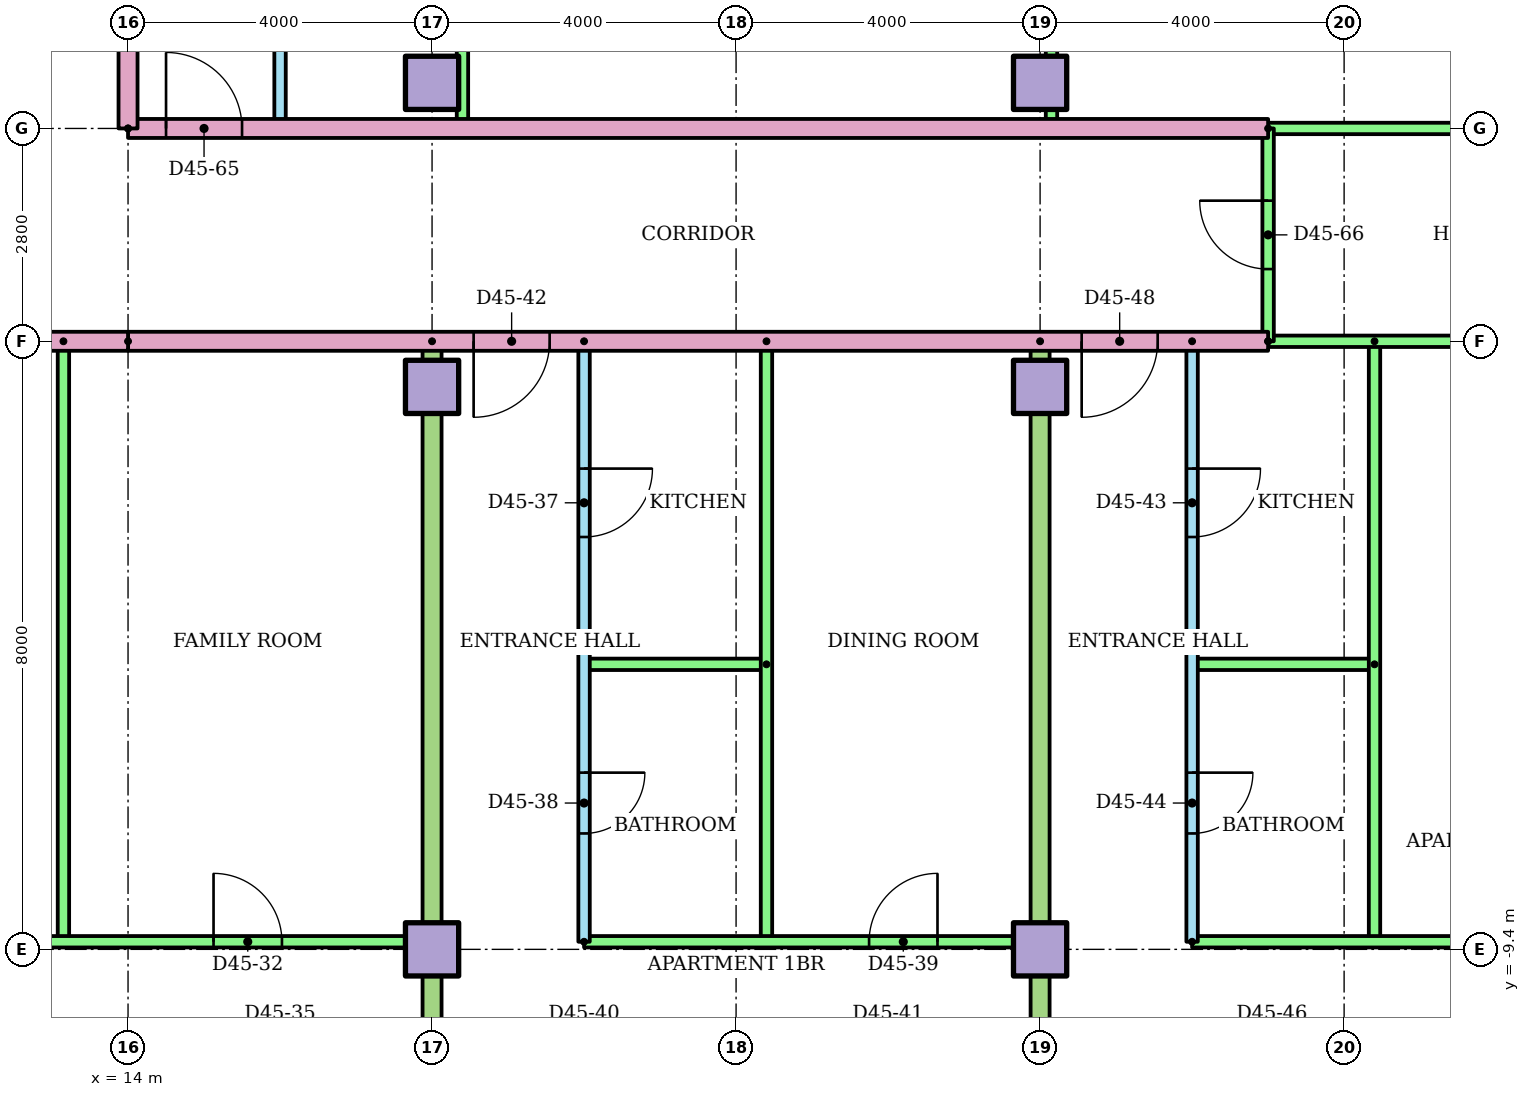
"""IFC4 building model, lengths in metres.
Left out: names, types, materials, properties, quantities, classifications, styles, units other than length and angle.
Written with IfcOpenShell. Run it as: python <this file> out.ifc"""

import sys

from ifc_helpers import new_model, si_unit, direction, frame, frame_2d, origin, origin_2d, place, context, subcontext, project, spatial, rectangle, extrude, element, fill, save


model = new_model("IFC4")
c1 = context("Model", 3, precision=1e-05, world=origin(), true_north=direction((0.0, 1.0)))
c2 = subcontext(c1, "Body", "Model", "MODEL_VIEW")
j1 = project(units=[si_unit("LENGTHUNIT", "METRE"), si_unit("PLANEANGLEUNIT", "RADIAN")], contexts=[c1])
p1 = place(None, origin())
s1 = spatial("IfcSite", under=j1, at=p1, CompositionType="ELEMENT")
p2 = place(p1, origin())
s2 = spatial("IfcBuilding", under=s1, at=p2, CompositionType="ELEMENT")
p3 = place(p2, frame((0.0, 0.0, 174.9)))
s3 = spatial("IfcBuildingStorey", under=s2, at=p3, CompositionType="ELEMENT", Elevation=174.9)
for number, where in (
    (1, (18.0, -9.4, 0.0)),
    (2, (26.0, -9.4, 0.0)),
    (3, (18.0, -2.0, 0.0)),
    (4, (26.0, -2.0, 0.0)),
    (5, (18.0, 2.0, 0.0)),
    (6, (26.0, 2.0, 0.0)),
):
    element("IfcColumn", number, at=place(p3, frame(where)), inside=s3, PredefinedType="COLUMN", context=c2, shape_type="SweptSolid", body=[
        extrude(rectangle(XDim=0.7, YDim=0.7, at=origin_2d()), origin(), (0.0, 0.0, 1.0), 3.2),
    ])
p4 = place(p3, frame((13.15, -1.4, 0.0), z_axis=(0.0, 0.0, 1.0), x_axis=(0.0, -1.0, 0.0)))
e7 = element("IfcWall", 7, at=p4, inside=s3, PredefinedType="PARTITIONING", context=c2, shape_type="SweptSolid", body=[
    extrude(rectangle(XDim=7.9, YDim=0.15, at=frame_2d((3.95, 0.0))), origin(), (0.0, 0.0, 1.0), 2.4),
])
p5 = place(p3, frame((4.0, -9.3, 0.0)))
e8 = element("IfcWall", 8, at=p5, inside=s3, PredefinedType="PARTITIONING", context=c2, shape_type="SweptSolid", body=[
    extrude(rectangle(XDim=14.0, YDim=0.15, at=frame_2d((7.0, 0.0))), origin(), (0.0, 0.0, 1.0), 2.4),
])
p6 = place(p5, frame((3.45, 0.0, 0.0)))
e9 = element("IfcOpeningElement", 9, at=p6, cuts=e8, PredefinedType="OPENING", context=c2, shape_type="SweptSolid", body=[
    extrude(rectangle(XDim=0.9, YDim=2.1, at=frame_2d((0.45, 1.05))), frame((0.0, 0.085, 0.0), z_axis=(0.0, -1.0, 0.0), x_axis=(1.0, 0.0, 0.0)), (0.0, 0.0, 1.0), 0.17),
])
p7 = place(p5, frame((6.825, 0.0, 0.0)))
e10 = element("IfcOpeningElement", 10, at=p7, cuts=e8, PredefinedType="OPENING", context=c2, shape_type="SweptSolid", body=[
    extrude(rectangle(XDim=0.9, YDim=2.1, at=frame_2d((0.45, 1.05))), frame((0.0, 0.085, 0.0), z_axis=(0.0, -1.0, 0.0), x_axis=(1.0, 0.0, 0.0)), (0.0, 0.0, 1.0), 0.17),
])
p8 = place(p5, frame((11.125, 0.0, 0.0)))
e11 = element("IfcOpeningElement", 11, at=p8, cuts=e8, PredefinedType="OPENING", context=c2, shape_type="SweptSolid", body=[
    extrude(rectangle(XDim=0.9, YDim=2.1, at=frame_2d((0.45, 1.05))), frame((0.0, 0.085, 0.0), z_axis=(0.0, -1.0, 0.0), x_axis=(1.0, 0.0, 0.0)), (0.0, 0.0, 1.0), 0.17),
])
p9 = place(p3, frame((20.0, -1.4, 0.0), z_axis=(0.0, 0.0, 1.0), x_axis=(0.0, -1.0, 0.0)))
e12 = element("IfcWall", 12, at=p9, inside=s3, PredefinedType="PARTITIONING", context=c2, shape_type="SweptSolid", body=[
    extrude(rectangle(XDim=7.9, YDim=0.15, at=frame_2d((3.95, 0.0))), origin(), (0.0, 0.0, 1.0), 2.4),
])
p10 = place(p9, frame((1.675, 0.0, 0.0)))
e13 = element("IfcOpeningElement", 13, at=p10, cuts=e12, PredefinedType="OPENING", context=c2, shape_type="SweptSolid", body=[
    extrude(rectangle(XDim=0.9, YDim=2.1, at=frame_2d((0.45, 1.05))), frame((0.0, 0.085, 0.0), z_axis=(0.0, -1.0, 0.0), x_axis=(1.0, 0.0, 0.0)), (0.0, 0.0, 1.0), 0.17),
])
p11 = place(p9, frame((5.675, 0.0, 0.0)))
e14 = element("IfcOpeningElement", 14, at=p11, cuts=e12, PredefinedType="OPENING", context=c2, shape_type="SweptSolid", body=[
    extrude(rectangle(XDim=0.8, YDim=2.1, at=frame_2d((0.4, 1.05))), frame((0.0, 0.085, 0.0), z_axis=(0.0, -1.0, 0.0), x_axis=(1.0, 0.0, 0.0)), (0.0, 0.0, 1.0), 0.17),
])
p12 = place(p3, frame((22.4, -5.65, 0.0), z_axis=(0.0, 0.0, 1.0), x_axis=(-1.0, 0.0, 0.0)))
e15 = element("IfcWall", 15, at=p12, inside=s3, PredefinedType="PARTITIONING", context=c2, shape_type="SweptSolid", body=[
    extrude(rectangle(XDim=2.4, YDim=0.15, at=frame_2d((1.2, 0.0))), origin(), (0.0, 0.0, 1.0), 2.4),
])
p13 = place(p3, frame((22.4, -1.4, 0.0), z_axis=(0.0, 0.0, 1.0), x_axis=(0.0, -1.0, 0.0)))
e16 = element("IfcWall", 16, at=p13, inside=s3, PredefinedType="PARTITIONING", context=c2, shape_type="SweptSolid", body=[
    extrude(rectangle(XDim=7.9, YDim=0.15, at=frame_2d((3.95, 0.0))), origin(), (0.0, 0.0, 1.0), 2.4),
])
p14 = place(p3, frame((20.0, -9.3, 0.0)))
e17 = element("IfcWall", 17, at=p14, inside=s3, PredefinedType="PARTITIONING", context=c2, shape_type="SweptSolid", body=[
    extrude(rectangle(XDim=6.0, YDim=0.15, at=frame_2d((3.0, 0.0))), origin(), (0.0, 0.0, 1.0), 2.4),
])
p15 = place(p14, frame((3.75, 0.0, 0.0)))
e18 = element("IfcOpeningElement", 18, at=p15, cuts=e17, PredefinedType="OPENING", context=c2, shape_type="SweptSolid", body=[
    extrude(rectangle(XDim=0.9, YDim=2.1, at=frame_2d((0.45, 1.05))), frame((0.0, 0.085, 0.0), z_axis=(0.0, -1.0, 0.0), x_axis=(1.0, 0.0, 0.0)), (0.0, 0.0, 1.0), 0.17),
])
p16 = place(p3, frame((18.0, -1.4, 0.0), z_axis=(0.0, 0.0, 1.0), x_axis=(0.0, -1.0, 0.0)))
e19 = element("IfcWall", 19, at=p16, inside=s3, PredefinedType="PARTITIONING", context=c2, shape_type="SweptSolid", body=[
    extrude(rectangle(XDim=15.01, YDim=0.25, at=frame_2d((7.505, 0.0))), origin(), (0.0, 0.0, 1.0), 2.4),
])
p17 = place(p3, frame((28.0, -1.4, 0.0), z_axis=(0.0, 0.0, 1.0), x_axis=(0.0, -1.0, 0.0)))
e20 = element("IfcWall", 20, at=p17, inside=s3, PredefinedType="PARTITIONING", context=c2, shape_type="SweptSolid", body=[
    extrude(rectangle(XDim=7.9, YDim=0.15, at=frame_2d((3.95, 0.0))), origin(), (0.0, 0.0, 1.0), 2.4),
])
p18 = place(p17, frame((1.675, 0.0, 0.0)))
e21 = element("IfcOpeningElement", 21, at=p18, cuts=e20, PredefinedType="OPENING", context=c2, shape_type="SweptSolid", body=[
    extrude(rectangle(XDim=0.9, YDim=2.1, at=frame_2d((0.45, 1.05))), frame((0.0, 0.085, 0.0), z_axis=(0.0, -1.0, 0.0), x_axis=(1.0, 0.0, 0.0)), (0.0, 0.0, 1.0), 0.17),
])
p19 = place(p17, frame((5.675, 0.0, 0.0)))
e22 = element("IfcOpeningElement", 22, at=p19, cuts=e20, PredefinedType="OPENING", context=c2, shape_type="SweptSolid", body=[
    extrude(rectangle(XDim=0.8, YDim=2.1, at=frame_2d((0.4, 1.05))), frame((0.0, 0.085, 0.0), z_axis=(0.0, -1.0, 0.0), x_axis=(1.0, 0.0, 0.0)), (0.0, 0.0, 1.0), 0.17),
])
p20 = place(p3, frame((30.4, -5.65, 0.0), z_axis=(0.0, 0.0, 1.0), x_axis=(-1.0, 0.0, 0.0)))
e23 = element("IfcWall", 23, at=p20, inside=s3, PredefinedType="PARTITIONING", context=c2, shape_type="SweptSolid", body=[
    extrude(rectangle(XDim=2.4, YDim=0.15, at=frame_2d((1.2, 0.0))), origin(), (0.0, 0.0, 1.0), 2.4),
])
p21 = place(p3, frame((30.4, -1.4, 0.0), z_axis=(0.0, 0.0, 1.0), x_axis=(0.0, -1.0, 0.0)))
e24 = element("IfcWall", 24, at=p21, inside=s3, PredefinedType="PARTITIONING", context=c2, shape_type="SweptSolid", body=[
    extrude(rectangle(XDim=7.9, YDim=0.15, at=frame_2d((3.95, 0.0))), origin(), (0.0, 0.0, 1.0), 2.4),
])
p22 = place(p3, frame((28.0, -9.3, 0.0)))
e25 = element("IfcWall", 25, at=p22, inside=s3, PredefinedType="PARTITIONING", context=c2, shape_type="SweptSolid", body=[
    extrude(rectangle(XDim=8.82, YDim=0.15, at=frame_2d((4.41, 0.0))), origin(), (0.0, 0.0, 1.0), 2.4),
])
p23 = place(p22, frame((4.553, 0.0, 0.0)))
e26 = element("IfcOpeningElement", 26, at=p23, cuts=e25, PredefinedType="OPENING", context=c2, shape_type="SweptSolid", body=[
    extrude(rectangle(XDim=0.9, YDim=2.1, at=frame_2d((0.45, 1.05))), frame((0.0, 0.085, 0.0), z_axis=(0.0, -1.0, 0.0), x_axis=(1.0, 0.0, 0.0)), (0.0, 0.0, 1.0), 0.17),
])
p24 = place(p3, frame((26.0, -1.4, 0.0), z_axis=(0.0, 0.0, 1.0), x_axis=(0.0, -1.0, 0.0)))
e27 = element("IfcWall", 27, at=p24, inside=s3, PredefinedType="PARTITIONING", context=c2, shape_type="SweptSolid", body=[
    extrude(rectangle(XDim=15.01, YDim=0.25, at=frame_2d((7.505, 0.0))), origin(), (0.0, 0.0, 1.0), 2.4),
])
p25 = place(p3, frame((29.0, -1.4, 0.0), z_axis=(0.0, 0.0, 1.0), x_axis=(-1.0, 0.0, 0.0)))
e28 = element("IfcWall", 28, at=p25, inside=s3, PredefinedType="PARTITIONING", context=c2, shape_type="SweptSolid", body=[
    extrude(rectangle(XDim=15.0, YDim=0.25, at=frame_2d((7.5, 0.0))), origin(), (0.0, 0.0, 1.0), 2.4),
])
p26 = place(p25, frame((9.453, 0.0, 0.0)))
e29 = element("IfcOpeningElement", 29, at=p26, cuts=e28, PredefinedType="OPENING", context=c2, shape_type="SweptSolid", body=[
    extrude(rectangle(XDim=1.0, YDim=2.1, at=frame_2d((0.5, 1.05))), frame((0.0, 0.135, 0.0), z_axis=(0.0, -1.0, 0.0), x_axis=(1.0, 0.0, 0.0)), (0.0, 0.0, 1.0), 0.27),
])
p27 = place(p25, frame((1.453, 0.0, 0.0)))
e30 = element("IfcOpeningElement", 30, at=p27, cuts=e28, PredefinedType="OPENING", context=c2, shape_type="SweptSolid", body=[
    extrude(rectangle(XDim=1.0, YDim=2.1, at=frame_2d((0.5, 1.05))), frame((0.0, 0.135, 0.0), z_axis=(0.0, -1.0, 0.0), x_axis=(1.0, 0.0, 0.0)), (0.0, 0.0, 1.0), 0.27),
])
p28 = place(p3, frame((36.82, -1.4, 0.0), z_axis=(0.0, 0.0, 1.0), x_axis=(-1.0, 0.0, 0.0)))
e31 = element("IfcWall", 31, at=p28, inside=s3, PredefinedType="PARTITIONING", context=c2, shape_type="SweptSolid", body=[
    extrude(rectangle(XDim=7.82, YDim=0.15, at=frame_2d((3.91, 0.0))), origin(), (0.0, 0.0, 1.0), 2.4),
])
p29 = place(p3, frame((16.0, 11.7, 0.0), z_axis=(0.0, 0.0, 1.0), x_axis=(0.0, -1.0, 0.0)))
e32 = element("IfcWall", 32, at=p29, inside=s3, PredefinedType="PARTITIONING", context=c2, shape_type="SweptSolid", body=[
    extrude(rectangle(XDim=10.3, YDim=0.15, at=frame_2d((5.15, 0.0))), origin(), (0.0, 0.0, 1.0), 2.4),
])
p30 = place(p29, frame((6.975, 0.0, 0.0)))
e33 = element("IfcOpeningElement", 33, at=p30, cuts=e32, PredefinedType="OPENING", context=c2, shape_type="SweptSolid", body=[
    extrude(rectangle(XDim=0.9, YDim=2.1, at=frame_2d((0.45, 1.05))), frame((0.0, 0.085, 0.0), z_axis=(0.0, -1.0, 0.0), x_axis=(1.0, 0.0, 0.0)), (0.0, 0.0, 1.0), 0.17),
])
p31 = place(p29, frame((1.875, 0.0, 0.0)))
e34 = element("IfcOpeningElement", 34, at=p31, cuts=e32, PredefinedType="OPENING", context=c2, shape_type="SweptSolid", body=[
    extrude(rectangle(XDim=0.8, YDim=2.1, at=frame_2d((0.4, 1.05))), frame((0.0, 0.085, 0.0), z_axis=(0.0, -1.0, 0.0), x_axis=(1.0, 0.0, 0.0)), (0.0, 0.0, 1.0), 0.17),
])
for number, where, z_axis, x_axis in (
    (35, (18.4, 11.7, 0.0), (0.0, 0.0, 1.0), (0.0, -1.0, 0.0)),
    (36, (26.15, 11.7, 0.0), (0.0, 0.0, 1.0), (0.0, -1.0, 0.0)),
):
    element("IfcWall", number, at=place(p3, frame(where, z_axis=z_axis, x_axis=x_axis)), inside=s3, PredefinedType="PARTITIONING", context=c2, shape_type="SweptSolid", body=[
        extrude(rectangle(XDim=10.3, YDim=0.15, at=frame_2d((5.15, 0.0))), origin(), (0.0, 0.0, 1.0), 2.4),
    ])
p32 = place(p3, frame((14.0, 1.4, 0.0)))
e37 = element("IfcWall", 37, at=p32, inside=s3, PredefinedType="PARTITIONING", context=c2, shape_type="SweptSolid", body=[
    extrude(rectangle(XDim=15.0, YDim=0.25, at=frame_2d((7.5, 0.0))), origin(), (0.0, 0.0, 1.0), 2.4),
])
p33 = place(p32, frame((0.5, 0.0, 0.0)))
e38 = element("IfcOpeningElement", 38, at=p33, cuts=e37, PredefinedType="OPENING", context=c2, shape_type="SweptSolid", body=[
    extrude(rectangle(XDim=1.0, YDim=2.1, at=frame_2d((0.5, 1.05))), frame((0.0, 0.135, 0.0), z_axis=(0.0, -1.0, 0.0), x_axis=(1.0, 0.0, 0.0)), (0.0, 0.0, 1.0), 0.27),
])
p34 = place(p3, frame((29.0, 1.4, 0.0)))
e39 = element("IfcWall", 39, at=p34, inside=s3, PredefinedType="PARTITIONING", context=c2, shape_type="SweptSolid", body=[
    extrude(rectangle(XDim=7.82, YDim=0.15, at=frame_2d((3.91, 0.0))), origin(), (0.0, 0.0, 1.0), 2.4),
])
p35 = place(p3, frame((29.0, -1.4, 0.0), z_axis=(0.0, 0.0, 1.0), x_axis=(0.0, 1.0, 0.0)))
e40 = element("IfcWall", 40, at=p35, inside=s3, PredefinedType="PARTITIONING", context=c2, shape_type="SweptSolid", body=[
    extrude(rectangle(XDim=2.8, YDim=0.15, at=frame_2d((1.4, 0.0))), origin(), (0.0, 0.0, 1.0), 2.4),
])
p36 = place(p35, frame((0.95, 0.0, 0.0)))
e41 = element("IfcOpeningElement", 41, at=p36, cuts=e40, PredefinedType="OPENING", context=c2, shape_type="SweptSolid", body=[
    extrude(rectangle(XDim=0.9, YDim=2.1, at=frame_2d((0.45, 1.05))), frame((0.0, 0.085, 0.0), z_axis=(0.0, -1.0, 0.0), x_axis=(1.0, 0.0, 0.0)), (0.0, 0.0, 1.0), 0.17),
])
p37 = place(p3, frame((14.0, -1.4, 0.0), z_axis=(0.0, 0.0, 1.0), x_axis=(-1.0, 0.0, 0.0)))
e42 = element("IfcWall", 42, at=p37, inside=s3, PredefinedType="PARTITIONING", context=c2, shape_type="SweptSolid", body=[
    extrude(rectangle(XDim=28.0, YDim=0.25, at=frame_2d((14.0, 0.0))), origin(), (0.0, 0.0, 1.0), 2.4),
])
p38 = place(p37, frame((12.547, 0.0, 0.0)))
e43 = element("IfcOpeningElement", 43, at=p38, cuts=e42, PredefinedType="OPENING", context=c2, shape_type="SweptSolid", body=[
    extrude(rectangle(XDim=1.0, YDim=2.1, at=frame_2d((0.5, 1.05))), frame((0.0, 0.135, 0.0), z_axis=(0.0, -1.0, 0.0), x_axis=(1.0, 0.0, 0.0)), (0.0, 0.0, 1.0), 0.27),
])
p39 = place(p37, frame((10.453, 0.0, 0.0)))
e44 = element("IfcOpeningElement", 44, at=p39, cuts=e42, PredefinedType="OPENING", context=c2, shape_type="SweptSolid", body=[
    extrude(rectangle(XDim=1.0, YDim=2.1, at=frame_2d((0.5, 1.05))), frame((0.0, 0.135, 0.0), z_axis=(0.0, -1.0, 0.0), x_axis=(1.0, 0.0, 0.0)), (0.0, 0.0, 1.0), 0.27),
])
p40 = place(p3, frame((14.0, 1.4, 0.0), z_axis=(0.0, 0.0, 1.0), x_axis=(0.0, 1.0, 0.0)))
e45 = element("IfcWall", 45, at=p40, inside=s3, PredefinedType="PARTITIONING", context=c2, shape_type="SweptSolid", body=[
    extrude(rectangle(XDim=1.6, YDim=0.25, at=frame_2d((0.8, 0.0))), origin(), (0.0, 0.0, 1.0), 2.4),
])
p41 = place(p8, origin())
e46 = element("IfcDoor", 46, at=p41, inside=s3, OperationType="SINGLE_SWING_LEFT", PredefinedType="DOOR", context=c2, shape_type="SweptSolid", body=[
    extrude(rectangle(XDim=0.9, YDim=2.1, at=frame_2d((0.45, 1.05))), frame((0.0, 0.025, 0.0), z_axis=(0.0, -1.0, 0.0), x_axis=(1.0, 0.0, 0.0)), (0.0, 0.0, 1.0), 0.05),
])
fill(e11, e46)
p42 = place(p10, origin())
e47 = element("IfcDoor", 47, at=p42, inside=s3, OperationType="SINGLE_SWING_LEFT", PredefinedType="DOOR", context=c2, shape_type="SweptSolid", body=[
    extrude(rectangle(XDim=0.9, YDim=2.1, at=frame_2d((0.45, 1.05))), frame((0.0, 0.025, 0.0), z_axis=(0.0, -1.0, 0.0), x_axis=(1.0, 0.0, 0.0)), (0.0, 0.0, 1.0), 0.05),
])
fill(e13, e47)
p43 = place(p11, origin())
e48 = element("IfcDoor", 48, at=p43, inside=s3, OperationType="SINGLE_SWING_LEFT", PredefinedType="DOOR", context=c2, shape_type="SweptSolid", body=[
    extrude(rectangle(XDim=0.8, YDim=2.1, at=frame_2d((0.4, 1.05))), frame((0.0, 0.025, 0.0), z_axis=(0.0, -1.0, 0.0), x_axis=(1.0, 0.0, 0.0)), (0.0, 0.0, 1.0), 0.05),
])
fill(e14, e48)
p44 = place(p15, origin())
e49 = element("IfcDoor", 49, at=p44, inside=s3, OperationType="SINGLE_SWING_RIGHT", PredefinedType="DOOR", context=c2, shape_type="SweptSolid", body=[
    extrude(rectangle(XDim=0.9, YDim=2.1, at=frame_2d((0.45, 1.05))), frame((0.0, 0.025, 0.0), z_axis=(0.0, -1.0, 0.0), x_axis=(1.0, 0.0, 0.0)), (0.0, 0.0, 1.0), 0.05),
])
fill(e18, e49)
p45 = place(p26, origin())
e50 = element("IfcDoor", 50, at=p45, inside=s3, OperationType="SINGLE_SWING_RIGHT", PredefinedType="DOOR", context=c2, shape_type="SweptSolid", body=[
    extrude(rectangle(XDim=1.0, YDim=2.1, at=frame_2d((0.5, 1.05))), frame((0.0, 0.025, 0.0), z_axis=(0.0, -1.0, 0.0), x_axis=(1.0, 0.0, 0.0)), (0.0, 0.0, 1.0), 0.05),
])
fill(e29, e50)
p46 = place(p18, origin())
e51 = element("IfcDoor", 51, at=p46, inside=s3, OperationType="SINGLE_SWING_LEFT", PredefinedType="DOOR", context=c2, shape_type="SweptSolid", body=[
    extrude(rectangle(XDim=0.9, YDim=2.1, at=frame_2d((0.45, 1.05))), frame((0.0, 0.025, 0.0), z_axis=(0.0, -1.0, 0.0), x_axis=(1.0, 0.0, 0.0)), (0.0, 0.0, 1.0), 0.05),
])
fill(e21, e51)
p47 = place(p19, origin())
e52 = element("IfcDoor", 52, at=p47, inside=s3, OperationType="SINGLE_SWING_LEFT", PredefinedType="DOOR", context=c2, shape_type="SweptSolid", body=[
    extrude(rectangle(XDim=0.8, YDim=2.1, at=frame_2d((0.4, 1.05))), frame((0.0, 0.025, 0.0), z_axis=(0.0, -1.0, 0.0), x_axis=(1.0, 0.0, 0.0)), (0.0, 0.0, 1.0), 0.05),
])
fill(e22, e52)
p48 = place(p27, origin())
e53 = element("IfcDoor", 53, at=p48, inside=s3, OperationType="SINGLE_SWING_RIGHT", PredefinedType="DOOR", context=c2, shape_type="SweptSolid", body=[
    extrude(rectangle(XDim=1.0, YDim=2.1, at=frame_2d((0.5, 1.05))), frame((0.0, 0.025, 0.0), z_axis=(0.0, -1.0, 0.0), x_axis=(1.0, 0.0, 0.0)), (0.0, 0.0, 1.0), 0.05),
])
fill(e30, e53)
p49 = place(p33, origin())
e54 = element("IfcDoor", 54, at=p49, inside=s3, OperationType="SINGLE_SWING_LEFT", PredefinedType="DOOR", context=c2, shape_type="SweptSolid", body=[
    extrude(rectangle(XDim=1.0, YDim=2.1, at=frame_2d((0.5, 1.05))), frame((0.0, 0.025, 0.0), z_axis=(0.0, -1.0, 0.0), x_axis=(1.0, 0.0, 0.0)), (0.0, 0.0, 1.0), 0.05),
])
fill(e38, e54)
p50 = place(p36, origin())
e55 = element("IfcDoor", 55, at=p50, inside=s3, OperationType="SINGLE_SWING_RIGHT", PredefinedType="DOOR", context=c2, shape_type="SweptSolid", body=[
    extrude(rectangle(XDim=0.9, YDim=2.1, at=frame_2d((0.45, 1.05))), frame((0.0, 0.025, 0.0), z_axis=(0.0, -1.0, 0.0), x_axis=(1.0, 0.0, 0.0)), (0.0, 0.0, 1.0), 0.05),
])
fill(e41, e55)
save(model, sys.argv[1])
